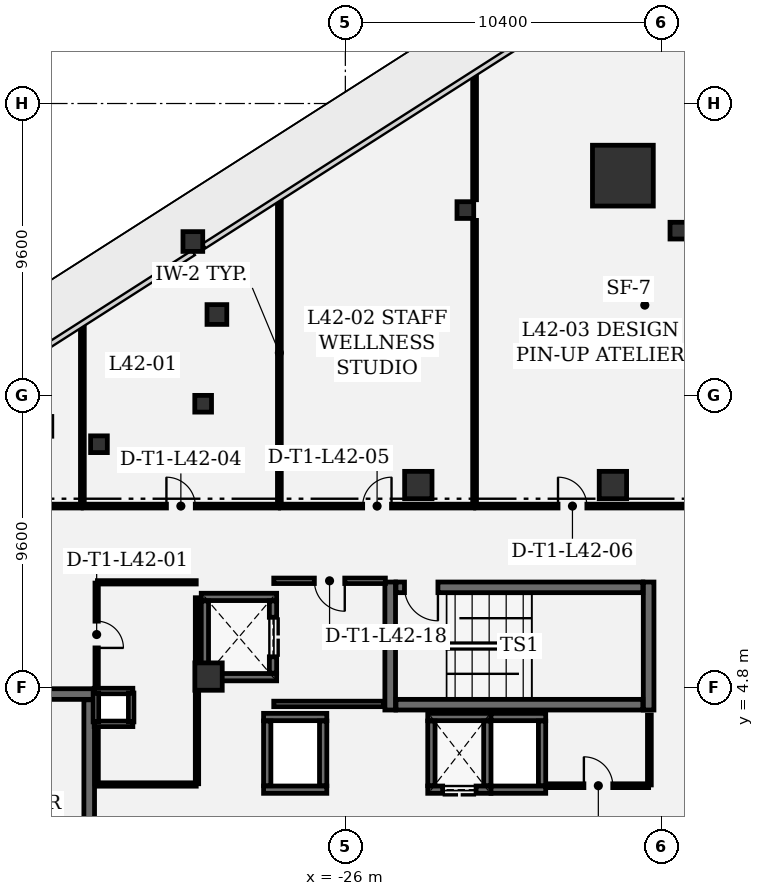
"""IFC4 building model, lengths in metres.
Left out: names, types, materials, properties, quantities, classifications, styles, units other than length and angle.
Written with IfcOpenShell. Run it as: python <this file> out.ifc"""

import sys

from ifc_helpers import new_model, si_unit, direction, frame, frame_2d, origin, origin_2d, place, context, subcontext, project, spatial, rectangle, extrude, element, fill, save


model = new_model("IFC4")
c1 = context("Model", 3, precision=1e-05, world=origin(), true_north=direction((0.0, 1.0)))
c2 = subcontext(c1, "Body", "Model", "MODEL_VIEW")
j1 = project(units=[si_unit("LENGTHUNIT", "METRE"), si_unit("PLANEANGLEUNIT", "RADIAN")], contexts=[c1])
p1 = place(None, origin())
s1 = spatial("IfcSite", under=j1, at=p1, CompositionType="ELEMENT")
p2 = place(p1, origin())
s2 = spatial("IfcBuilding", under=s1, at=p2, CompositionType="ELEMENT")
p3 = place(p2, frame((0.0, 0.0, 184.8)))
s3 = spatial("IfcBuildingStorey", under=s2, at=p3, CompositionType="ELEMENT", Elevation=184.8)
p4 = place(p3, frame((-16.872, 21.627, 0.0), z_axis=(0.0, 0.0, 1.0), x_axis=(1.0, 0.0, 0.0)))
e1 = element("IfcColumn", 1, at=p4, inside=s3, PredefinedType="COLUMN", context=c2, shape_type="SweptSolid", body=[
    extrude(rectangle(XDim=2.0, YDim=2.0, at=origin_2d()), origin(), (0.0, 0.0, 1.0), 4.05),
])
for number, where, z_axis, x_axis in (
    (2, (-23.6, 11.45, 0.0), (0.0, 0.0, 1.0), (1.0, 0.0, 0.0)),
    (3, (-17.2, 11.45, 0.0), (0.0, 0.0, 1.0), (1.0, 0.0, 0.0)),
    (4, (-30.5, 5.15, 0.0), (0.0, 0.0, 1.0), (1.0, 0.0, 0.0)),
):
    element("IfcColumn", number, at=place(p3, frame(where, z_axis=z_axis, x_axis=x_axis)), inside=s3, PredefinedType="COLUMN", context=c2, shape_type="SweptSolid", body=[
        extrude(rectangle(XDim=0.9, YDim=0.9, at=origin_2d()), origin(), (0.0, 0.0, 1.0), 4.05),
    ])
for number, where, z_axis, x_axis in (
    (5, (-31.016, 19.46, 0.0), (0.0, 0.0, 1.0), (1.0, 0.0, 0.0)),
    (6, (-30.225, 17.06, 0.0), (0.0, 0.0, 1.0), (1.0, 0.0, 0.0)),
):
    element("IfcColumn", number, at=place(p3, frame(where, z_axis=z_axis, x_axis=x_axis)), inside=s3, PredefinedType="COLUMN", context=c2, shape_type="SweptSolid", body=[
        extrude(rectangle(XDim=0.65, YDim=0.65, at=origin_2d()), origin(), (0.0, 0.0, 1.0), 4.05),
    ])
for number, where, z_axis, x_axis in (
    (7, (-34.104, 12.792, 0.0), (0.0, 0.0, 1.0), (1.0, 0.0, 0.0)),
    (8, (-22.053, 20.495, 0.0), (0.0, 0.0, 1.0), (1.0, 0.0, 0.0)),
    (9, (-30.677, 14.124, 0.0), (0.0, 0.0, 1.0), (1.0, 0.0, 0.0)),
    (10, (-15.046, 19.818, 0.0), (0.0, 0.0, 1.0), (1.0, 0.0, 0.0)),
):
    element("IfcColumn", number, at=place(p3, frame(where, z_axis=z_axis, x_axis=x_axis)), inside=s3, PredefinedType="COLUMN", context=c2, shape_type="SweptSolid", body=[
        extrude(rectangle(XDim=0.55, YDim=0.55, at=origin_2d()), origin(), (0.0, 0.0, 1.0), 4.05),
    ])
for number, where, z_axis, x_axis in (
    (11, (-24.525, 8.26, 0.0), (0.0, 0.0, 1.0), (0.0, -1.0, 0.0)),
    (12, (-16.025, 4.05, 0.0), (0.0, 0.0, 1.0), (0.0, 1.0, 0.0)),
):
    element("IfcWall", number, at=place(p3, frame(where, z_axis=z_axis, x_axis=x_axis)), inside=s3, PredefinedType="SHEAR", context=c2, shape_type="SweptSolid", body=[
        extrude(rectangle(XDim=4.21, YDim=0.35, at=frame_2d((2.105, 0.0))), origin(), (0.0, 0.0, 1.0), 3.78),
    ])
p5 = place(p3, frame((-24.335, 4.225, 0.0), z_axis=(0.0, 0.0, 1.0), x_axis=(1.0, 0.0, 0.0)))
e13 = element("IfcWall", 13, at=p5, inside=s3, PredefinedType="SHEAR", context=c2, shape_type="SweptSolid", body=[
    extrude(rectangle(XDim=8.12, YDim=0.35, at=frame_2d((4.06, 0.0))), origin(), (0.0, 0.0, 1.0), 3.78),
])
p6 = place(p3, frame((-16.215, 8.085, 0.0), z_axis=(0.0, 0.0, 1.0), x_axis=(-1.0, 0.0, 0.0)))
e14 = element("IfcWall", 14, at=p6, inside=s3, PredefinedType="SHEAR", context=c2, shape_type="SweptSolid", body=[
    extrude(rectangle(XDim=8.12, YDim=0.35, at=frame_2d((4.06, 0.0))), origin(), (0.0, 0.0, 1.0), 3.78),
])
p7 = place(p6, frame((6.74, 0.0, 0.0)))
e15 = element("IfcOpeningElement", 15, at=p7, cuts=e14, PredefinedType="OPENING", context=c2, shape_type="SweptSolid", body=[
    extrude(rectangle(XDim=1.1, YDim=2.2, at=frame_2d((0.55, 1.1))), frame((0.0, 0.185, 0.0), z_axis=(0.0, -1.0, 0.0), x_axis=(1.0, 0.0, 0.0)), (0.0, 0.0, 1.0), 0.37),
])
p8 = place(p3, frame((-34.25, 4.575, 0.0), z_axis=(0.0, 0.0, 1.0), x_axis=(-1.0, 0.0, 0.0)))
e16 = element("IfcWall", 16, at=p8, inside=s3, PredefinedType="SHEAR", context=c2, shape_type="SweptSolid", body=[
    extrude(rectangle(XDim=4.21, YDim=0.35, at=frame_2d((2.105, 0.0))), origin(), (0.0, 0.0, 1.0), 3.78),
])
p9 = place(p3, frame((-34.425, -4.385, 0.0), z_axis=(0.0, 0.0, 1.0), x_axis=(0.0, 1.0, 0.0)))
e17 = element("IfcWall", 17, at=p9, inside=s3, PredefinedType="SHEAR", context=c2, shape_type="SweptSolid", body=[
    extrude(rectangle(XDim=8.77, YDim=0.35, at=frame_2d((4.385, 0.0))), origin(), (0.0, 0.0, 1.0), 3.78),
])
for number, where, z_axis, x_axis in (
    (18, (-28.26, 5.13, 0.0), (0.0, 0.0, 1.0), (-1.0, 0.0, 0.0)),
    (19, (-30.74, 7.77, 0.0), (0.0, 0.0, 1.0), (1.0, 0.0, 0.0)),
):
    element("IfcWall", number, at=place(p3, frame(where, z_axis=z_axis, x_axis=x_axis)), inside=s3, PredefinedType="SHEAR", context=c2, shape_type="SweptSolid", body=[
        extrude(rectangle(XDim=2.48, YDim=0.24, at=frame_2d((1.24, 0.0))), origin(), (0.0, 0.0, 1.0), 3.78),
    ])
p10 = place(p3, frame((-30.62, 5.262, 0.0), z_axis=(0.0, 0.0, 1.0), x_axis=(0.0, 1.0, 0.0)))
e20 = element("IfcWall", 20, at=p10, inside=s3, PredefinedType="SHEAR", context=c2, shape_type="SweptSolid", body=[
    extrude(rectangle(XDim=2.376, YDim=0.24, at=frame_2d((1.188, 0.0))), origin(), (0.0, 0.0, 1.0), 3.78),
])
p11 = place(p3, frame((-28.38, 7.638, 0.0), z_axis=(0.0, 0.0, 1.0), x_axis=(0.0, -1.0, 0.0)))
e21 = element("IfcWall", 21, at=p11, inside=s3, PredefinedType="SHEAR", context=c2, shape_type="SweptSolid", body=[
    extrude(rectangle(XDim=2.376, YDim=0.24, at=frame_2d((1.188, 0.0))), origin(), (0.0, 0.0, 1.0), 3.78),
])
p12 = place(p11, frame((0.538, 0.0, 0.0)))
e22 = element("IfcOpeningElement", 22, at=p12, cuts=e21, PredefinedType="OPENING", context=c2, shape_type="SweptSolid", body=[
    extrude(rectangle(XDim=1.3, YDim=2.3, at=frame_2d((0.65, 1.15))), frame((0.0, 0.13, 0.0), z_axis=(0.0, -1.0, 0.0), x_axis=(1.0, 0.0, 0.0)), (0.0, 0.0, 1.0), 0.26),
])
for number, where, z_axis, x_axis in (
    (23, (-26.61, 1.43, 0.0), (0.0, 0.0, 1.0), (-1.0, 0.0, 0.0)),
    (24, (-28.69, 3.82, 0.0), (0.0, 0.0, 1.0), (1.0, 0.0, 0.0)),
):
    element("IfcWall", number, at=place(p3, frame(where, z_axis=z_axis, x_axis=x_axis)), inside=s3, PredefinedType="SHEAR", context=c2, shape_type="SweptSolid", body=[
        extrude(rectangle(XDim=2.08, YDim=0.24, at=frame_2d((1.04, 0.0))), origin(), (0.0, 0.0, 1.0), 3.78),
    ])
for number, where, z_axis, x_axis in (
    (25, (-28.57, 1.562, 0.0), (0.0, 0.0, 1.0), (0.0, 1.0, 0.0)),
    (26, (-26.73, 3.688, 0.0), (0.0, 0.0, 1.0), (0.0, -1.0, 0.0)),
):
    element("IfcWall", number, at=place(p3, frame(where, z_axis=z_axis, x_axis=x_axis)), inside=s3, PredefinedType="SHEAR", context=c2, shape_type="SweptSolid", body=[
        extrude(rectangle(XDim=2.126, YDim=0.24, at=frame_2d((1.063, 0.0))), origin(), (0.0, 0.0, 1.0), 3.78),
    ])
p13 = place(p3, frame((-21.21, 1.43, 0.0), z_axis=(0.0, 0.0, 1.0), x_axis=(-1.0, 0.0, 0.0)))
e27 = element("IfcWall", 27, at=p13, inside=s3, PredefinedType="SHEAR", context=c2, shape_type="SweptSolid", body=[
    extrude(rectangle(XDim=2.08, YDim=0.24, at=frame_2d((1.04, 0.0))), origin(), (0.0, 0.0, 1.0), 3.78),
])
p14 = place(p13, frame((0.49, 0.0, 0.0)))
e28 = element("IfcOpeningElement", 28, at=p14, cuts=e27, PredefinedType="OPENING", context=c2, shape_type="SweptSolid", body=[
    extrude(rectangle(XDim=1.1, YDim=2.2, at=frame_2d((0.55, 1.1))), frame((0.0, 0.13, 0.0), z_axis=(0.0, -1.0, 0.0), x_axis=(1.0, 0.0, 0.0)), (0.0, 0.0, 1.0), 0.26),
])
p15 = place(p3, frame((-23.29, 3.82, 0.0), z_axis=(0.0, 0.0, 1.0), x_axis=(1.0, 0.0, 0.0)))
e29 = element("IfcWall", 29, at=p15, inside=s3, PredefinedType="SHEAR", context=c2, shape_type="SweptSolid", body=[
    extrude(rectangle(XDim=2.08, YDim=0.24, at=frame_2d((1.04, 0.0))), origin(), (0.0, 0.0, 1.0), 3.78),
])
for number, where, z_axis, x_axis in (
    (30, (-23.17, 1.562, 0.0), (0.0, 0.0, 1.0), (0.0, 1.0, 0.0)),
    (31, (-21.33, 3.688, 0.0), (0.0, 0.0, 1.0), (0.0, -1.0, 0.0)),
):
    element("IfcWall", number, at=place(p3, frame(where, z_axis=z_axis, x_axis=x_axis)), inside=s3, PredefinedType="SHEAR", context=c2, shape_type="SweptSolid", body=[
        extrude(rectangle(XDim=2.126, YDim=0.24, at=frame_2d((1.063, 0.0))), origin(), (0.0, 0.0, 1.0), 3.78),
    ])
for number, where, z_axis, x_axis in (
    (32, (-19.41, 1.43, 0.0), (0.0, 0.0, 1.0), (-1.0, 0.0, 0.0)),
    (33, (-21.21, 3.82, 0.0), (0.0, 0.0, 1.0), (1.0, 0.0, 0.0)),
):
    element("IfcWall", number, at=place(p3, frame(where, z_axis=z_axis, x_axis=x_axis)), inside=s3, PredefinedType="SHEAR", context=c2, shape_type="SweptSolid", body=[
        extrude(rectangle(XDim=1.8, YDim=0.24, at=frame_2d((0.9, 0.0))), origin(), (0.0, 0.0, 1.0), 3.78),
    ])
p16 = place(p3, frame((-19.53, 3.688, 0.0), z_axis=(0.0, 0.0, 1.0), x_axis=(0.0, -1.0, 0.0)))
e34 = element("IfcWall", 34, at=p16, inside=s3, PredefinedType="SHEAR", context=c2, shape_type="SweptSolid", body=[
    extrude(rectangle(XDim=2.126, YDim=0.24, at=frame_2d((1.063, 0.0))), origin(), (0.0, 0.0, 1.0), 3.78),
])
for number, where, z_axis, x_axis in (
    (35, (-32.99, 3.595, 0.0), (0.0, 0.0, 1.0), (-1.0, 0.0, 0.0)),
    (36, (-34.26, 4.675, 0.0), (0.0, 0.0, 1.0), (1.0, 0.0, 0.0)),
):
    element("IfcWall", number, at=place(p3, frame(where, z_axis=z_axis, x_axis=x_axis)), inside=s3, PredefinedType="PARTITIONING", context=c2, shape_type="SweptSolid", body=[
        extrude(rectangle(XDim=1.27, YDim=0.18, at=frame_2d((0.635, 0.0))), origin(), (0.0, 0.0, 1.0), 3.78),
    ])
for number, where, z_axis, x_axis in (
    (37, (-34.205, 3.66, 0.0), (0.0, 0.0, 1.0), (0.0, 1.0, 0.0)),
    (38, (-33.045, 4.61, 0.0), (0.0, 0.0, 1.0), (0.0, -1.0, 0.0)),
):
    element("IfcWall", number, at=place(p3, frame(where, z_axis=z_axis, x_axis=x_axis)), inside=s3, PredefinedType="PARTITIONING", context=c2, shape_type="SweptSolid", body=[
        extrude(rectangle(XDim=0.95, YDim=0.18, at=frame_2d((0.475, 0.0))), origin(), (0.0, 0.0, 1.0), 3.78),
    ])
p17 = place(p3, frame((-28.355, 4.25, 0.0), z_axis=(0.0, 0.0, 1.0), x_axis=(1.0, 0.0, 0.0)))
e39 = element("IfcWall", 39, at=p17, inside=s3, PredefinedType="PARTITIONING", context=c2, shape_type="SweptSolid", body=[
    extrude(rectangle(XDim=3.622, YDim=0.18, at=frame_2d((1.811, 0.0))), origin(), (0.0, 0.0, 1.0), 3.78),
])
p18 = place(p3, frame((-24.684, 8.3, 0.0), z_axis=(0.0, 0.0, 1.0), x_axis=(-1.0, 0.0, 0.0)))
e40 = element("IfcWall", 40, at=p18, inside=s3, PredefinedType="PARTITIONING", context=c2, shape_type="SweptSolid", body=[
    extrude(rectangle(XDim=3.671, YDim=0.18, at=frame_2d((1.835, 0.0))), origin(), (0.0, 0.0, 1.0), 3.78),
])
p19 = place(p18, frame((1.335, 0.0, 0.0)))
e41 = element("IfcOpeningElement", 41, at=p19, cuts=e40, PredefinedType="OPENING", context=c2, shape_type="SweptSolid", body=[
    extrude(rectangle(XDim=1.0, YDim=2.15, at=frame_2d((0.5, 1.075))), frame((0.0, 0.1, 0.0), z_axis=(0.0, -1.0, 0.0), x_axis=(1.0, 0.0, 0.0)), (0.0, 0.0, 1.0), 0.2),
])
p20 = place(p3, frame((-34.155, 1.6, 0.0), z_axis=(0.0, 0.0, 1.0), x_axis=(1.0, 0.0, 0.0)))
e42 = element("IfcWall", 42, at=p20, inside=s3, PredefinedType="PARTITIONING", context=c2, shape_type="SweptSolid", body=[
    extrude(rectangle(XDim=3.25, YDim=0.11, at=frame_2d((1.625, 0.0))), origin(), (0.0, 0.0, 1.0), 3.78),
])
p21 = place(p3, frame((-30.88, 1.625, 0.0), z_axis=(0.0, 0.0, 1.0), x_axis=(0.0, 1.0, 0.0)))
e43 = element("IfcWall", 43, at=p21, inside=s3, PredefinedType="PARTITIONING", context=c2, shape_type="SweptSolid", body=[
    extrude(rectangle(XDim=3.01, YDim=0.11, at=frame_2d((1.505, 0.0))), origin(), (0.0, 0.0, 1.0), 3.78),
])
p22 = place(p3, frame((-30.88, 5.665, 0.0), z_axis=(0.0, 0.0, 1.0), x_axis=(0.0, 1.0, 0.0)))
e44 = element("IfcWall", 44, at=p22, inside=s3, PredefinedType="PARTITIONING", context=c2, shape_type="SweptSolid", body=[
    extrude(rectangle(XDim=2.078, YDim=0.11, at=frame_2d((1.039, 0.0))), origin(), (0.0, 0.0, 1.0), 3.78),
])
p23 = place(p3, frame((-30.905, 8.25, 0.0), z_axis=(0.0, 0.0, 1.0), x_axis=(-1.0, 0.0, 0.0)))
e45 = element("IfcWall", 45, at=p23, inside=s3, PredefinedType="PARTITIONING", context=c2, shape_type="SweptSolid", body=[
    extrude(rectangle(XDim=3.25, YDim=0.11, at=frame_2d((1.625, 0.0))), origin(), (0.0, 0.0, 1.0), 3.78),
])
p24 = place(p3, frame((-34.18, 8.225, 0.0), z_axis=(0.0, 0.0, 1.0), x_axis=(0.0, -1.0, 0.0)))
e46 = element("IfcWall", 46, at=p24, inside=s3, PredefinedType="PARTITIONING", context=c2, shape_type="SweptSolid", body=[
    extrude(rectangle(XDim=3.385, YDim=0.11, at=frame_2d((1.692, 0.0))), origin(), (0.0, 0.0, 1.0), 3.78),
])
p25 = place(p24, frame((1.252, 0.0, 0.0)))
e47 = element("IfcOpeningElement", 47, at=p25, cuts=e46, PredefinedType="OPENING", context=c2, shape_type="SweptSolid", body=[
    extrude(rectangle(XDim=0.88, YDim=2.1, at=frame_2d((0.44, 1.05))), frame((0.0, 0.065, 0.0), z_axis=(0.0, -1.0, 0.0), x_axis=(1.0, 0.0, 0.0)), (0.0, 0.0, 1.0), 0.13),
])
p26 = place(p3, frame((-34.18, 3.43, 0.0), z_axis=(0.0, 0.0, 1.0), x_axis=(0.0, -1.0, 0.0)))
e48 = element("IfcWall", 48, at=p26, inside=s3, PredefinedType="PARTITIONING", context=c2, shape_type="SweptSolid", body=[
    extrude(rectangle(XDim=1.805, YDim=0.11, at=frame_2d((0.902, 0.0))), origin(), (0.0, 0.0, 1.0), 3.78),
])
p27 = place(p3, frame((-19.334, 1.56, 0.0), z_axis=(0.0, 0.0, 1.0), x_axis=(1.0, 0.0, 0.0)))
e49 = element("IfcWall", 49, at=p27, inside=s3, PredefinedType="PARTITIONING", context=c2, shape_type="SweptSolid", body=[
    extrude(rectangle(XDim=3.309, YDim=0.125, at=frame_2d((1.654, 0.0))), origin(), (0.0, 0.0, 1.0), 3.78),
])
p28 = place(p27, frame((1.179, 0.0, 0.0)))
e50 = element("IfcOpeningElement", 50, at=p28, cuts=e49, PredefinedType="OPENING", context=c2, shape_type="SweptSolid", body=[
    extrude(rectangle(XDim=0.95, YDim=2.15, at=frame_2d((0.475, 1.075))), frame((0.0, 0.073, 0.0), z_axis=(0.0, -1.0, 0.0), x_axis=(1.0, 0.0, 0.0)), (0.0, 0.0, 1.0), 0.145),
])
p29 = place(p3, frame((-16.0, 1.585, 0.0), z_axis=(0.0, 0.0, 1.0), x_axis=(0.0, 1.0, 0.0)))
e51 = element("IfcWall", 51, at=p29, inside=s3, PredefinedType="PARTITIONING", context=c2, shape_type="SweptSolid", body=[
    extrude(rectangle(XDim=2.302, YDim=0.125, at=frame_2d((1.151, 0.0))), origin(), (0.0, 0.0, 1.0), 3.78),
])
p30 = place(p3, frame((-34.625, 10.758, 0.0), z_axis=(0.0, 0.0, 1.0), x_axis=(1.0, 0.0, 0.0)))
e52 = element("IfcWall", 52, at=p30, inside=s3, PredefinedType="PARTITIONING", context=c2, shape_type="SweptSolid", body=[
    extrude(rectangle(XDim=6.43, YDim=0.125, at=frame_2d((3.215, 0.0))), origin(), (0.0, 0.0, 1.0), 2.9),
])
p31 = place(p30, frame((2.74, 0.0, 0.0)))
e53 = element("IfcOpeningElement", 53, at=p31, cuts=e52, PredefinedType="OPENING", context=c2, shape_type="SweptSolid", body=[
    extrude(rectangle(XDim=0.95, YDim=2.15, at=frame_2d((0.475, 1.075))), frame((0.0, 0.073, 0.0), z_axis=(0.0, -1.0, 0.0), x_axis=(1.0, 0.0, 0.0)), (0.0, 0.0, 1.0), 0.145),
])
p32 = place(p3, frame((-28.17, 10.783, 0.0), z_axis=(0.0, 0.0, 1.0), x_axis=(0.0, 1.0, 0.0)))
e54 = element("IfcWall", 54, at=p32, inside=s3, PredefinedType="PARTITIONING", context=c2, shape_type="SweptSolid", body=[
    extrude(rectangle(XDim=10.033, YDim=0.125, at=frame_2d((5.017, 0.0))), origin(), (0.0, 0.0, 1.0), 3.78),
])
p33 = place(p3, frame((-34.65, 16.676, 0.0), z_axis=(0.0, 0.0, 1.0), x_axis=(0.0, -1.0, 0.0)))
e55 = element("IfcWall", 55, at=p33, inside=s3, PredefinedType="PARTITIONING", context=c2, shape_type="SweptSolid", body=[
    extrude(rectangle(XDim=5.892, YDim=0.125, at=frame_2d((2.946, 0.0))), origin(), (0.0, 0.0, 1.0), 3.78),
])
p34 = place(p3, frame((-28.138, 10.758, 0.0), z_axis=(0.0, 0.0, 1.0), x_axis=(1.0, 0.0, 0.0)))
e56 = element("IfcWall", 56, at=p34, inside=s3, PredefinedType="PARTITIONING", context=c2, shape_type="SweptSolid", body=[
    extrude(rectangle(XDim=6.363, YDim=0.125, at=frame_2d((3.182, 0.0))), origin(), (0.0, 0.0, 1.0), 3.78),
])
p35 = place(p34, frame((2.707, 0.0, 0.0)))
e57 = element("IfcOpeningElement", 57, at=p35, cuts=e56, PredefinedType="OPENING", context=c2, shape_type="SweptSolid", body=[
    extrude(rectangle(XDim=0.95, YDim=2.15, at=frame_2d((0.475, 1.075))), frame((0.0, 0.073, 0.0), z_axis=(0.0, -1.0, 0.0), x_axis=(1.0, 0.0, 0.0)), (0.0, 0.0, 1.0), 0.145),
])
p36 = place(p3, frame((-21.75, 10.783, 0.0), z_axis=(0.0, 0.0, 1.0), x_axis=(0.0, 1.0, 0.0)))
e58 = element("IfcWall", 58, at=p36, inside=s3, PredefinedType="PARTITIONING", context=c2, shape_type="SweptSolid", body=[
    extrude(rectangle(XDim=9.372, YDim=0.125, at=frame_2d((4.686, 0.0))), origin(), (0.0, 0.0, 1.0), 2.895),
])
p37 = place(p3, frame((-21.75, 20.835, 0.0), z_axis=(0.0, 0.0, 1.0), x_axis=(0.0, 1.0, 0.0)))
e59 = element("IfcWall", 59, at=p37, inside=s3, PredefinedType="PARTITIONING", context=c2, shape_type="SweptSolid", body=[
    extrude(rectangle(XDim=4.085, YDim=0.125, at=frame_2d((2.043, 0.0))), origin(), (0.0, 0.0, 1.0), 3.78),
])
p38 = place(p3, frame((-21.717, 10.758, 0.0), z_axis=(0.0, 0.0, 1.0), x_axis=(1.0, 0.0, 0.0)))
e60 = element("IfcWall", 60, at=p38, inside=s3, PredefinedType="PARTITIONING", context=c2, shape_type="SweptSolid", body=[
    extrude(rectangle(XDim=8.542, YDim=0.125, at=frame_2d((4.271, 0.0))), origin(), (0.0, 0.0, 1.0), 3.344),
])
p39 = place(p38, frame((2.711, 0.0, 0.0)))
e61 = element("IfcOpeningElement", 61, at=p39, cuts=e60, PredefinedType="OPENING", context=c2, shape_type="SweptSolid", body=[
    extrude(rectangle(XDim=0.95, YDim=2.15, at=frame_2d((0.475, 1.075))), frame((0.0, 0.073, 0.0), z_axis=(0.0, -1.0, 0.0), x_axis=(1.0, 0.0, 0.0)), (0.0, 0.0, 1.0), 0.145),
])
p40 = place(p3, frame((-37.833, 10.758, 0.0), z_axis=(0.0, 0.0, 1.0), x_axis=(1.0, 0.0, 0.0)))
e62 = element("IfcWall", 62, at=p40, inside=s3, PredefinedType="PARTITIONING", context=c2, shape_type="SweptSolid", body=[
    extrude(rectangle(XDim=3.15, YDim=0.125, at=frame_2d((1.575, 0.0))), origin(), (0.0, 0.0, 1.0), 2.9),
])
p41 = place(p40, frame((1.1, 0.0, 0.0)))
e63 = element("IfcOpeningElement", 63, at=p41, cuts=e62, PredefinedType="OPENING", context=c2, shape_type="SweptSolid", body=[
    extrude(rectangle(XDim=0.95, YDim=2.15, at=frame_2d((0.475, 1.075))), frame((0.0, 0.073, 0.0), z_axis=(0.0, -1.0, 0.0), x_axis=(1.0, 0.0, 0.0)), (0.0, 0.0, 1.0), 0.145),
])
p42 = place(p7, origin())
e64 = element("IfcDoor", 64, at=p42, inside=s3, OperationType="SINGLE_SWING_LEFT", PredefinedType="DOOR", context=c2, shape_type="SweptSolid", body=[
    extrude(rectangle(XDim=1.1, YDim=2.2, at=frame_2d((0.55, 1.1))), frame((0.0, 0.025, 0.0), z_axis=(0.0, -1.0, 0.0), x_axis=(1.0, 0.0, 0.0)), (0.0, 0.0, 1.0), 0.05),
])
fill(e15, e64)
p43 = place(p12, origin())
e65 = element("IfcDoor", 65, at=p43, inside=s3, OperationType="DOUBLE_DOOR_SLIDING", PredefinedType="DOOR", context=c2, shape_type="SweptSolid", body=[
    extrude(rectangle(XDim=1.3, YDim=2.3, at=frame_2d((0.65, 1.15))), frame((0.0, 0.025, 0.0), z_axis=(0.0, -1.0, 0.0), x_axis=(1.0, 0.0, 0.0)), (0.0, 0.0, 1.0), 0.05),
])
fill(e22, e65)
p44 = place(p14, origin())
e66 = element("IfcDoor", 66, at=p44, inside=s3, OperationType="DOUBLE_DOOR_SLIDING", PredefinedType="DOOR", context=c2, shape_type="SweptSolid", body=[
    extrude(rectangle(XDim=1.1, YDim=2.2, at=frame_2d((0.55, 1.1))), frame((0.0, 0.025, 0.0), z_axis=(0.0, -1.0, 0.0), x_axis=(1.0, 0.0, 0.0)), (0.0, 0.0, 1.0), 0.05),
])
fill(e28, e66)
p45 = place(p25, origin())
e67 = element("IfcDoor", 67, at=p45, inside=s3, OperationType="SINGLE_SWING_RIGHT", PredefinedType="DOOR", context=c2, shape_type="SweptSolid", body=[
    extrude(rectangle(XDim=0.88, YDim=2.1, at=frame_2d((0.44, 1.05))), frame((0.0, 0.025, 0.0), z_axis=(0.0, -1.0, 0.0), x_axis=(1.0, 0.0, 0.0)), (0.0, 0.0, 1.0), 0.05),
])
fill(e47, e67)
p46 = place(p28, origin())
e68 = element("IfcDoor", 68, at=p46, inside=s3, OperationType="SINGLE_SWING_LEFT", PredefinedType="DOOR", context=c2, shape_type="SweptSolid", body=[
    extrude(rectangle(XDim=0.95, YDim=2.15, at=frame_2d((0.475, 1.075))), frame((0.0, 0.025, 0.0), z_axis=(0.0, -1.0, 0.0), x_axis=(1.0, 0.0, 0.0)), (0.0, 0.0, 1.0), 0.05),
])
fill(e50, e68)
p47 = place(p31, origin())
e69 = element("IfcDoor", 69, at=p47, inside=s3, OperationType="SINGLE_SWING_LEFT", PredefinedType="DOOR", context=c2, shape_type="SweptSolid", body=[
    extrude(rectangle(XDim=0.95, YDim=2.15, at=frame_2d((0.475, 1.075))), frame((0.0, 0.025, 0.0), z_axis=(0.0, -1.0, 0.0), x_axis=(1.0, 0.0, 0.0)), (0.0, 0.0, 1.0), 0.05),
])
fill(e53, e69)
p48 = place(p35, origin())
e70 = element("IfcDoor", 70, at=p48, inside=s3, OperationType="SINGLE_SWING_RIGHT", PredefinedType="DOOR", context=c2, shape_type="SweptSolid", body=[
    extrude(rectangle(XDim=0.95, YDim=2.15, at=frame_2d((0.475, 1.075))), frame((0.0, 0.025, 0.0), z_axis=(0.0, -1.0, 0.0), x_axis=(1.0, 0.0, 0.0)), (0.0, 0.0, 1.0), 0.05),
])
fill(e57, e70)
p49 = place(p39, origin())
e71 = element("IfcDoor", 71, at=p49, inside=s3, OperationType="SINGLE_SWING_LEFT", PredefinedType="DOOR", context=c2, shape_type="SweptSolid", body=[
    extrude(rectangle(XDim=0.95, YDim=2.15, at=frame_2d((0.475, 1.075))), frame((0.0, 0.025, 0.0), z_axis=(0.0, -1.0, 0.0), x_axis=(1.0, 0.0, 0.0)), (0.0, 0.0, 1.0), 0.05),
])
fill(e61, e71)
p50 = place(p19, origin())
e72 = element("IfcDoor", 72, at=p50, inside=s3, OperationType="SINGLE_SWING_LEFT", PredefinedType="DOOR", context=c2, shape_type="SweptSolid", body=[
    extrude(rectangle(XDim=1.0, YDim=2.15, at=frame_2d((0.5, 1.075))), frame((0.0, 0.025, 0.0), z_axis=(0.0, -1.0, 0.0), x_axis=(1.0, 0.0, 0.0)), (0.0, 0.0, 1.0), 0.05),
])
fill(e41, e72)
save(model, sys.argv[1])
